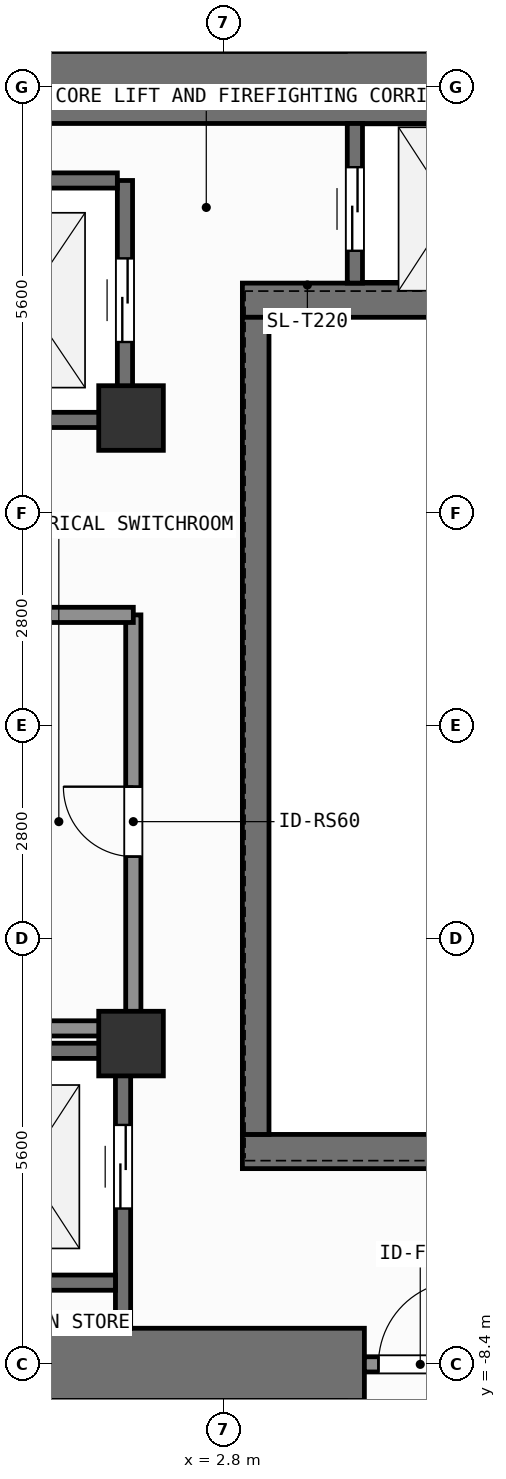
"""IFC4 building model, lengths in metres.
Left out: names, types, materials, properties, quantities, classifications, styles, units other than length and angle.
Written with IfcOpenShell. Run it as: python <this file> out.ifc"""

import sys

from ifc_helpers import new_model, si_unit, direction, frame, frame_2d, origin, origin_2d, place, context, subcontext, project, spatial, rectangle, extrude, element, fill, save


model = new_model("IFC4")
c1 = context("Model", 3, precision=1e-05, world=origin(), true_north=direction((0.0, 1.0)))
c2 = subcontext(c1, "Body", "Model", "MODEL_VIEW")
j1 = project(units=[si_unit("LENGTHUNIT", "METRE"), si_unit("PLANEANGLEUNIT", "RADIAN")], contexts=[c1])
p1 = place(None, origin())
s1 = spatial("IfcSite", under=j1, at=p1, CompositionType="ELEMENT")
p2 = place(p1, origin())
s2 = spatial("IfcBuilding", under=s1, at=p2, CompositionType="ELEMENT")
p3 = place(p2, frame((0.0, 0.0, 132.9)))
s3 = spatial("IfcBuildingStorey", under=s2, at=p3, CompositionType="ELEMENT", Elevation=132.9)
p4 = place(p3, frame((-2.62, -8.4, 0.0), z_axis=(0.0, 0.0, 1.0), x_axis=(1.0, 0.0, 0.0)))
e1 = element("IfcWall", 1, at=p4, inside=s3, PredefinedType="SHEAR", context=c2, shape_type="SweptSolid", body=[
    extrude(rectangle(XDim=7.27, YDim=0.95, at=frame_2d((3.635, 0.0))), origin(), (0.0, 0.0, 1.0), 3.9),
])
p5 = place(p3, frame((-7.55, 8.4, 0.0), z_axis=(0.0, 0.0, 1.0), x_axis=(1.0, 0.0, 0.0)))
e2 = element("IfcWall", 2, at=p5, inside=s3, PredefinedType="SHEAR", context=c2, shape_type="SweptSolid", body=[
    extrude(rectangle(XDim=16.425, YDim=0.95, at=frame_2d((8.212, 0.0))), origin(), (0.0, 0.0, 1.0), 3.9),
])
for number, where, z_axis, x_axis in (
    (3, (3.045, -5.6, 0.0), (0.0, 0.0, 1.0), (1.0, 0.0, 0.0)),
    (4, (3.045, 5.6, 0.0), (0.0, 0.0, 1.0), (1.0, 0.0, 0.0)),
):
    element("IfcWall", number, at=place(p3, frame(where, z_axis=z_axis, x_axis=x_axis)), inside=s3, PredefinedType="SHEAR", context=c2, shape_type="SweptSolid", body=[
        extrude(rectangle(XDim=5.83, YDim=0.45, at=frame_2d((2.915, 0.0))), origin(), (0.0, 0.0, 1.0), 3.9),
    ])
p6 = place(p3, frame((3.22, -5.375, 0.0), z_axis=(0.0, 0.0, 1.0), x_axis=(0.0, 1.0, 0.0)))
e5 = element("IfcWall", 5, at=p6, inside=s3, PredefinedType="SHEAR", context=c2, shape_type="SweptSolid", body=[
    extrude(rectangle(XDim=10.75, YDim=0.35, at=frame_2d((5.375, 0.0))), origin(), (0.0, 0.0, 1.0), 3.9),
])
for number, where, z_axis, x_axis in (
    (6, (1.58, -4.18, 0.0), (0.0, 0.0, 1.0), (1.0, 0.0, 0.0)),
    (7, (1.58, 4.05, 0.0), (0.0, 0.0, 1.0), (1.0, 0.0, 0.0)),
):
    element("IfcColumn", number, at=place(p3, frame(where, z_axis=z_axis, x_axis=x_axis)), inside=s3, PredefinedType="COLUMN", context=c2, shape_type="SweptSolid", body=[
        extrude(rectangle(XDim=0.85, YDim=0.85, at=origin_2d()), origin(), (0.0, 0.0, 1.0), 3.9),
    ])
p7 = place(p3, frame((1.5, 4.025, 0.0), z_axis=(0.0, 0.0, 1.0), x_axis=(0.0, 1.0, 0.0)))
e8 = element("IfcWall", 8, at=p7, inside=s3, PredefinedType="SHEAR", context=c2, shape_type="SweptSolid", body=[
    extrude(rectangle(XDim=3.15, YDim=0.2, at=frame_2d((1.575, 0.0))), origin(), (0.0, 0.0, 1.0), 3.62),
])
p8 = place(p7, frame((1.025, 0.0, 0.0)))
e9 = element("IfcOpeningElement", 9, at=p8, cuts=e8, PredefinedType="OPENING", context=c2, shape_type="SweptSolid", body=[
    extrude(rectangle(XDim=1.1, YDim=2.2, at=frame_2d((0.55, 1.1))), frame((0.0, 0.11, 0.0), z_axis=(0.0, -1.0, 0.0), x_axis=(1.0, 0.0, 0.0)), (0.0, 0.0, 1.0), 0.22),
])
for number, where, z_axis, x_axis in (
    (10, (-1.0, 4.025, 0.0), (0.0, 0.0, 1.0), (1.0, 0.0, 0.0)),
    (11, (-1.0, 7.175, 0.0), (0.0, 0.0, 1.0), (1.0, 0.0, 0.0)),
):
    element("IfcWall", number, at=place(p3, frame(where, z_axis=z_axis, x_axis=x_axis)), inside=s3, PredefinedType="SHEAR", context=c2, shape_type="SweptSolid", body=[
        extrude(rectangle(XDim=2.4, YDim=0.2, at=frame_2d((1.2, 0.0))), origin(), (0.0, 0.0, 1.0), 3.62),
    ])
p9 = place(p3, frame((1.475, -7.925, 0.0), z_axis=(0.0, 0.0, 1.0), x_axis=(0.0, 1.0, 0.0)))
e12 = element("IfcWall", 12, at=p9, inside=s3, PredefinedType="SHEAR", context=c2, shape_type="SweptSolid", body=[
    extrude(rectangle(XDim=3.65, YDim=0.2, at=frame_2d((1.825, 0.0))), origin(), (0.0, 0.0, 1.0), 3.62),
])
p10 = place(p9, frame((1.575, 0.0, 0.0)))
e13 = element("IfcOpeningElement", 13, at=p10, cuts=e12, PredefinedType="OPENING", context=c2, shape_type="SweptSolid", body=[
    extrude(rectangle(XDim=1.1, YDim=2.2, at=frame_2d((0.55, 1.1))), frame((0.0, 0.11, 0.0), z_axis=(0.0, -1.0, 0.0), x_axis=(1.0, 0.0, 0.0)), (0.0, 0.0, 1.0), 0.22),
])
for number, where, z_axis, x_axis in (
    (14, (-0.975, -7.325, 0.0), (0.0, 0.0, 1.0), (1.0, 0.0, 0.0)),
    (15, (-0.975, -4.275, 0.0), (0.0, 0.0, 1.0), (1.0, 0.0, 0.0)),
):
    element("IfcWall", number, at=place(p3, frame(where, z_axis=z_axis, x_axis=x_axis)), inside=s3, PredefinedType="SHEAR", context=c2, shape_type="SweptSolid", body=[
        extrude(rectangle(XDim=2.35, YDim=0.2, at=frame_2d((1.175, 0.0))), origin(), (0.0, 0.0, 1.0), 3.62),
    ])
p11 = place(p3, frame((4.525, 5.825, 0.0), z_axis=(0.0, 0.0, 1.0), x_axis=(0.0, 1.0, 0.0)))
e16 = element("IfcWall", 16, at=p11, inside=s3, PredefinedType="SHEAR", context=c2, shape_type="SweptSolid", body=[
    extrude(rectangle(XDim=2.1, YDim=0.2, at=frame_2d((1.05, 0.0))), origin(), (0.0, 0.0, 1.0), 3.62),
])
p12 = place(p11, frame((0.425, 0.0, 0.0)))
e17 = element("IfcOpeningElement", 17, at=p12, cuts=e16, PredefinedType="OPENING", context=c2, shape_type="SweptSolid", body=[
    extrude(rectangle(XDim=1.1, YDim=2.2, at=frame_2d((0.55, 1.1))), frame((0.0, 0.11, 0.0), z_axis=(0.0, -1.0, 0.0), x_axis=(1.0, 0.0, 0.0)), (0.0, 0.0, 1.0), 0.22),
])
p13 = place(p3, frame((4.65, -8.4, 0.0), z_axis=(0.0, 0.0, 1.0), x_axis=(1.0, 0.0, 0.0)))
e18 = element("IfcWall", 18, at=p13, inside=s3, PredefinedType="SOLIDWALL", context=c2, shape_type="SweptSolid", body=[
    extrude(rectangle(XDim=1.47, YDim=0.2, at=frame_2d((0.735, 0.0))), origin(), (0.0, 0.0, 1.0), 2.66),
])
p14 = place(p13, frame((0.185, 0.0, 0.0)))
e19 = element("IfcOpeningElement", 19, at=p14, cuts=e18, PredefinedType="OPENING", context=c2, shape_type="SweptSolid", body=[
    extrude(rectangle(XDim=1.1, YDim=2.15, at=frame_2d((0.55, 1.075))), frame((0.0, 0.11, 0.0), z_axis=(0.0, -1.0, 0.0), x_axis=(1.0, 0.0, 0.0)), (0.0, 0.0, 1.0), 0.22),
])
p15 = place(p3, frame((1.61, -3.98, 0.0), z_axis=(0.0, 0.0, 1.0), x_axis=(0.0, 1.0, 0.0)))
e20 = element("IfcWall", 20, at=p15, inside=s3, PredefinedType="SOLIDWALL", context=c2, shape_type="SweptSolid", body=[
    extrude(rectangle(XDim=5.44, YDim=0.2, at=frame_2d((2.72, 0.0))), origin(), (0.0, 0.0, 1.0), 3.62),
])
p16 = place(p15, frame((2.26, 0.0, 0.0)))
e21 = element("IfcOpeningElement", 21, at=p16, cuts=e20, PredefinedType="OPENING", context=c2, shape_type="SweptSolid", body=[
    extrude(rectangle(XDim=0.92, YDim=2.1, at=frame_2d((0.46, 1.05))), frame((0.0, 0.11, 0.0), z_axis=(0.0, -1.0, 0.0), x_axis=(1.0, 0.0, 0.0)), (0.0, 0.0, 1.0), 0.22),
])
for number, where, z_axis, x_axis in (
    (22, (-1.58, -3.98, 0.0), (0.0, 0.0, 1.0), (1.0, 0.0, 0.0)),
    (23, (-1.58, 1.46, 0.0), (0.0, 0.0, 1.0), (1.0, 0.0, 0.0)),
):
    element("IfcWall", number, at=place(p3, frame(where, z_axis=z_axis, x_axis=x_axis)), inside=s3, PredefinedType="SOLIDWALL", context=c2, shape_type="SweptSolid", body=[
        extrude(rectangle(XDim=3.19, YDim=0.2, at=frame_2d((1.595, 0.0))), origin(), (0.0, 0.0, 1.0), 3.62),
    ])
p17 = place(p8, origin())
e24 = element("IfcDoor", 24, at=p17, inside=s3, OperationType="SLIDING_TO_LEFT", PredefinedType="DOOR", context=c2, shape_type="SweptSolid", body=[
    extrude(rectangle(XDim=1.1, YDim=2.2, at=frame_2d((0.55, 1.1))), frame((0.0, 0.025, 0.0), z_axis=(0.0, -1.0, 0.0), x_axis=(1.0, 0.0, 0.0)), (0.0, 0.0, 1.0), 0.05),
])
fill(e9, e24)
p18 = place(p10, origin())
e25 = element("IfcDoor", 25, at=p18, inside=s3, OperationType="SLIDING_TO_LEFT", PredefinedType="DOOR", context=c2, shape_type="SweptSolid", body=[
    extrude(rectangle(XDim=1.1, YDim=2.2, at=frame_2d((0.55, 1.1))), frame((0.0, 0.025, 0.0), z_axis=(0.0, -1.0, 0.0), x_axis=(1.0, 0.0, 0.0)), (0.0, 0.0, 1.0), 0.05),
])
fill(e13, e25)
p19 = place(p12, origin())
e26 = element("IfcDoor", 26, at=p19, inside=s3, OperationType="SLIDING_TO_LEFT", PredefinedType="DOOR", context=c2, shape_type="SweptSolid", body=[
    extrude(rectangle(XDim=1.1, YDim=2.2, at=frame_2d((0.55, 1.1))), frame((0.0, 0.025, 0.0), z_axis=(0.0, -1.0, 0.0), x_axis=(1.0, 0.0, 0.0)), (0.0, 0.0, 1.0), 0.05),
])
fill(e17, e26)
p20 = place(p14, origin())
e27 = element("IfcDoor", 27, at=p20, inside=s3, OperationType="SINGLE_SWING_RIGHT", PredefinedType="DOOR", context=c2, shape_type="SweptSolid", body=[
    extrude(rectangle(XDim=1.1, YDim=2.15, at=frame_2d((0.55, 1.075))), frame((0.0, 0.025, 0.0), z_axis=(0.0, -1.0, 0.0), x_axis=(1.0, 0.0, 0.0)), (0.0, 0.0, 1.0), 0.05),
])
fill(e19, e27)
p21 = place(p16, origin())
e28 = element("IfcDoor", 28, at=p21, inside=s3, OperationType="SINGLE_SWING_RIGHT", PredefinedType="DOOR", context=c2, shape_type="SweptSolid", body=[
    extrude(rectangle(XDim=0.92, YDim=2.1, at=frame_2d((0.46, 1.05))), frame((0.0, 0.025, 0.0), z_axis=(0.0, -1.0, 0.0), x_axis=(1.0, 0.0, 0.0)), (0.0, 0.0, 1.0), 0.05),
])
fill(e21, e28)
save(model, sys.argv[1])
